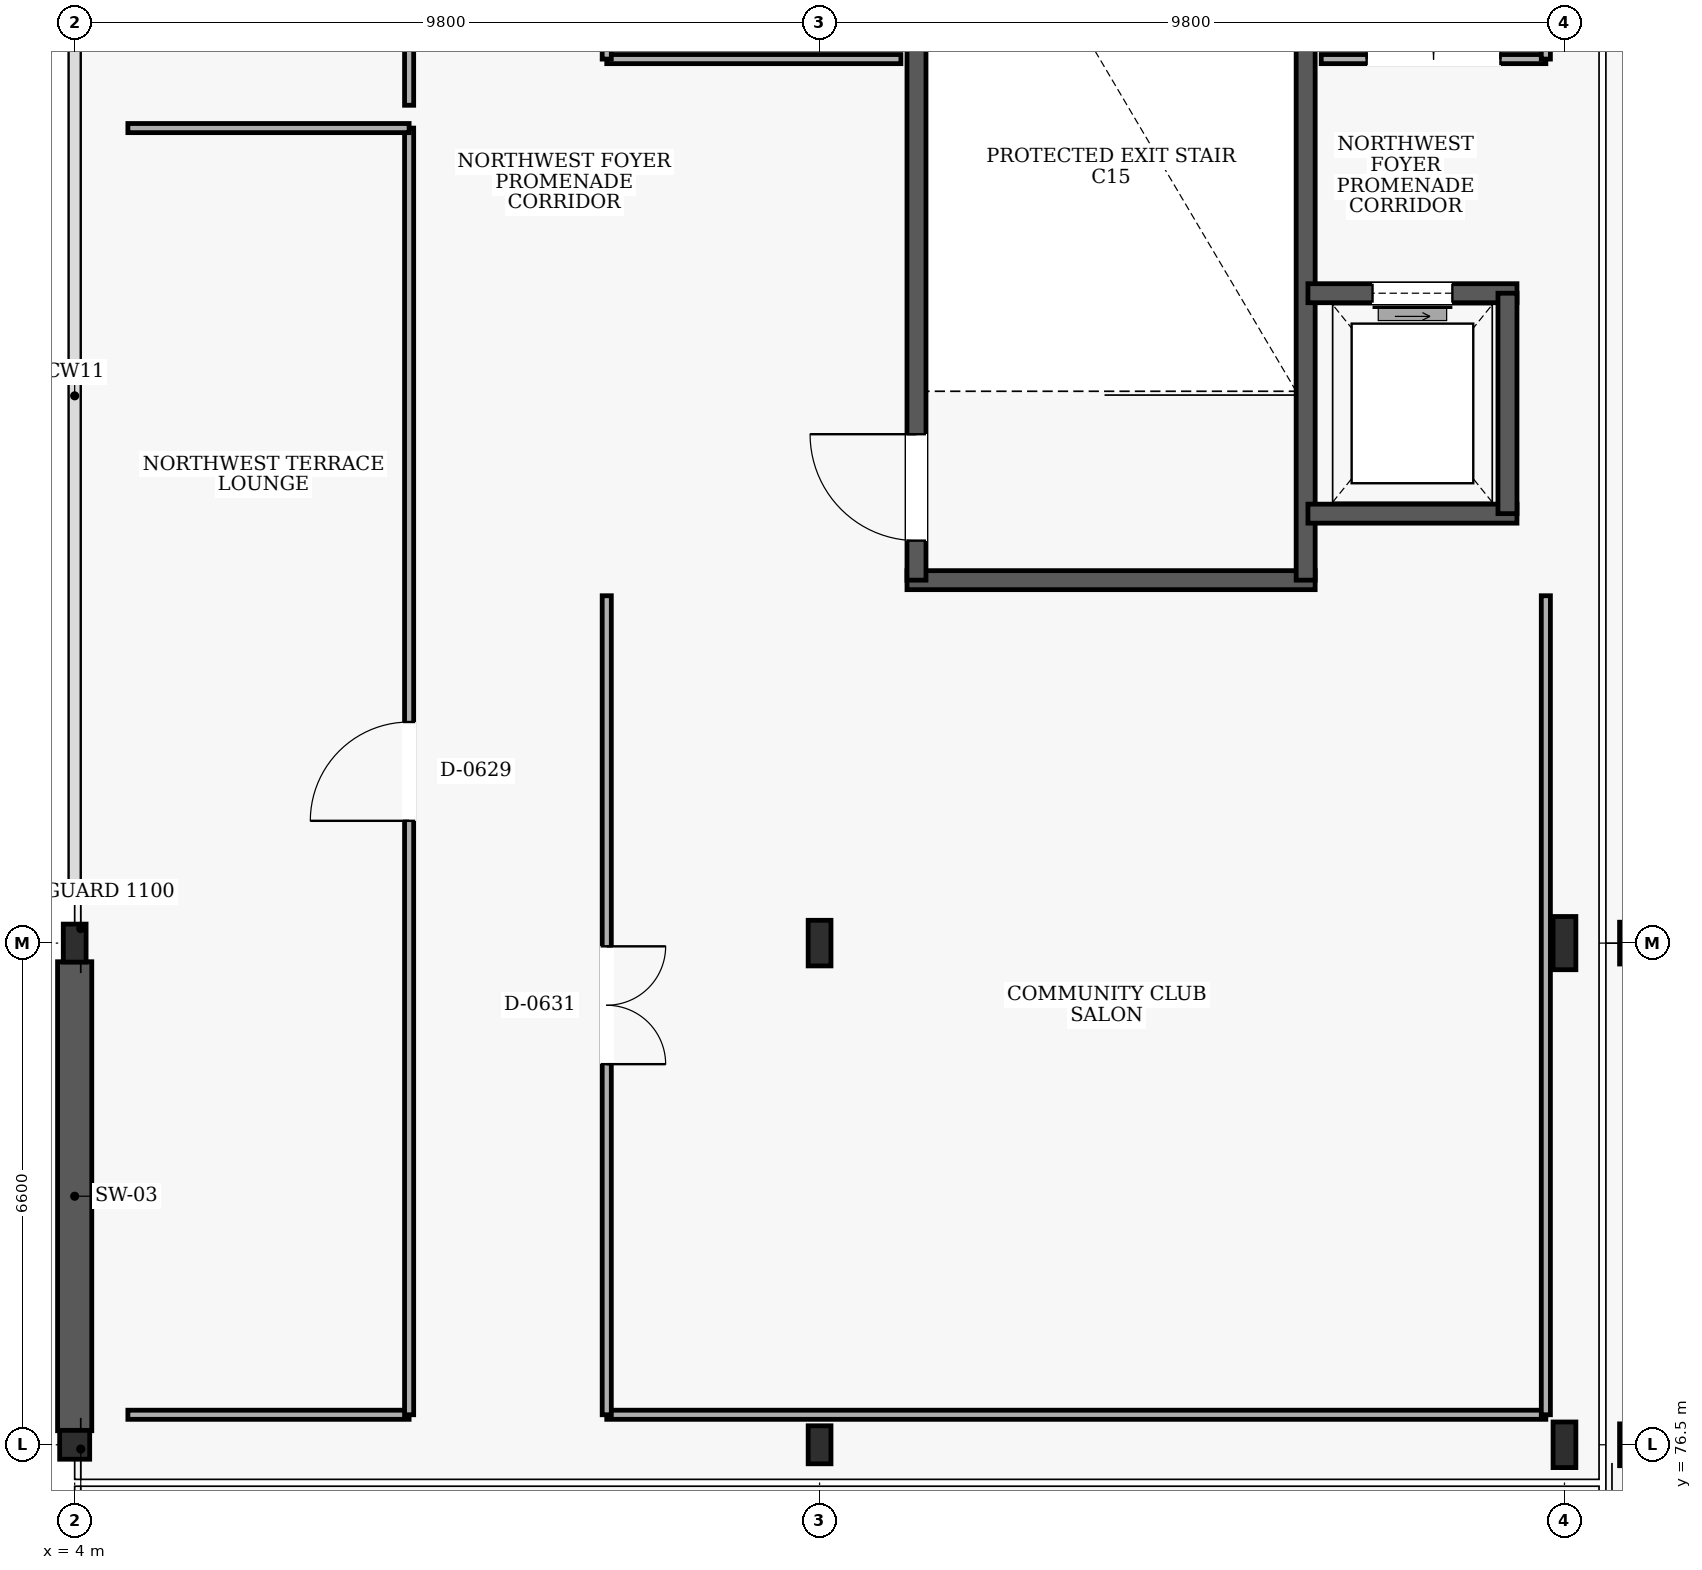
"""IFC4 building model, lengths in metres.
Left out: names, types, materials, properties, quantities, classifications, styles, units other than length and angle.
Written with IfcOpenShell. Run it as: python <this file> out.ifc"""

import sys

from ifc_helpers import new_model, si_unit, direction, frame, frame_2d, origin, origin_2d, place, context, subcontext, project, spatial, rectangle, i_section, extrude, element, fill, save


model = new_model("IFC4")
c1 = context("Model", 3, precision=1e-05, world=origin(), true_north=direction((0.0, 1.0)))
c2 = subcontext(c1, "Body", "Model", "MODEL_VIEW")
j1 = project(units=[si_unit("LENGTHUNIT", "METRE"), si_unit("PLANEANGLEUNIT", "RADIAN")], contexts=[c1])
p1 = place(None, origin())
s1 = spatial("IfcSite", under=j1, at=p1, CompositionType="ELEMENT")
p2 = place(p1, origin())
s2 = spatial("IfcBuilding", under=s1, at=p2, CompositionType="ELEMENT")
p3 = place(p2, frame((0.0, 0.0, 10.2)))
s3 = spatial("IfcBuildingStorey", under=s2, at=p3, CompositionType="ELEMENT", Elevation=10.2)
p4 = place(p3, frame((4.0, 76.5, 0.0), z_axis=(0.0, 0.0, 1.0), x_axis=(1.0, 0.0, 0.0)))
e1 = element("IfcColumn", 1, at=p4, inside=s3, PredefinedType="COLUMN", context=c2, shape_type="SweptSolid", body=[
    extrude(i_section(OverallWidth=0.395, OverallDepth=0.38, WebThickness=0.019, FlangeThickness=0.03, at=origin_2d()), origin(), (0.0, 0.0, 1.0), 4.8),
])
for number, where, z_axis, x_axis in (
    (2, (4.0, 83.1, 0.0), (0.0, 0.0, 1.0), (1.0, 0.0, 0.0)),
    (3, (13.8, 76.5, 0.0), (0.0, 0.0, 1.0), (1.0, 0.0, 0.0)),
):
    element("IfcColumn", number, at=place(p3, frame(where, z_axis=z_axis, x_axis=x_axis)), inside=s3, PredefinedType="COLUMN", context=c2, shape_type="SweptSolid", body=[
        extrude(i_section(OverallWidth=0.3, OverallDepth=0.5, WebThickness=0.014, FlangeThickness=0.028, at=origin_2d()), origin(), (0.0, 0.0, 1.0), 4.8),
    ])
for number, where, z_axis, x_axis in (
    (4, (13.8, 83.1, 0.0), (0.0, 0.0, 1.0), (1.0, 0.0, 0.0)),
    (5, (23.6, 76.5, 0.0), (0.0, 0.0, 1.0), (1.0, 0.0, 0.0)),
):
    element("IfcColumn", number, at=place(p3, frame(where, z_axis=z_axis, x_axis=x_axis)), inside=s3, PredefinedType="COLUMN", context=c2, shape_type="SweptSolid", body=[
        extrude(i_section(OverallWidth=0.3, OverallDepth=0.6, WebThickness=0.015, FlangeThickness=0.03, at=origin_2d()), origin(), (0.0, 0.0, 1.0), 4.8),
    ])
p5 = place(p3, frame((23.6, 83.1, 0.0), z_axis=(0.0, 0.0, 1.0), x_axis=(1.0, 0.0, 0.0)))
e6 = element("IfcColumn", 6, at=p5, inside=s3, PredefinedType="COLUMN", context=c2, shape_type="SweptSolid", body=[
    extrude(i_section(OverallWidth=0.3, OverallDepth=0.7, WebThickness=0.017, FlangeThickness=0.032, at=origin_2d()), origin(), (0.0, 0.0, 1.0), 4.8),
])
for number, where, z_axis, x_axis in (
    (7, (24.6, 76.5, 0.0), (0.0, 0.0, 1.0), (1.0, 0.0, 0.0)),
    (8, (24.6, 83.1, 0.0), (0.0, 0.0, 1.0), (1.0, 0.0, 0.0)),
):
    element("IfcColumn", number, at=place(p3, frame(where, z_axis=z_axis, x_axis=x_axis)), inside=s3, PredefinedType="COLUMN", context=c2, shape_type="SweptSolid", body=[
        extrude(rectangle(XDim=0.55, YDim=0.55, at=origin_2d()), origin(), (0.0, 0.0, 1.0), 4.8),
    ])
p6 = place(p3, frame((4.0, 76.685, 0.0), z_axis=(0.0, 0.0, 1.0), x_axis=(0.0, 1.0, 0.0)))
e9 = element("IfcWall", 9, at=p6, inside=s3, PredefinedType="SHEAR", context=c2, shape_type="SweptSolid", body=[
    extrude(rectangle(XDim=6.17, YDim=0.45, at=frame_2d((3.085, 0.0))), origin(), (0.0, 0.0, 1.0), 3.82),
])
p7 = place(p3, frame((14.95, 87.875, 0.0), z_axis=(0.0, 0.0, 1.0), x_axis=(1.0, 0.0, 0.0)))
e10 = element("IfcWall", 10, at=p7, inside=s3, PredefinedType="SHEAR", context=c2, shape_type="SweptSolid", body=[
    extrude(rectangle(XDim=5.37, YDim=0.25, at=frame_2d((2.685, 0.0))), origin(), (0.0, 0.0, 1.0), 4.48),
])
p8 = place(p3, frame((15.075, 87.875, 0.0), z_axis=(0.0, 0.0, 1.0), x_axis=(0.0, 1.0, 0.0)))
e11 = element("IfcWall", 11, at=p8, inside=s3, PredefinedType="SHEAR", context=c2, shape_type="SweptSolid", body=[
    extrude(rectangle(XDim=10.85, YDim=0.25, at=frame_2d((5.425, 0.0))), origin(), (0.0, 0.0, 1.0), 4.48),
])
p9 = place(p8, frame((0.52, 0.0, 0.0)))
e12 = element("IfcOpeningElement", 12, at=p9, cuts=e11, PredefinedType="OPENING", context=c2, shape_type="SweptSolid", body=[
    extrude(rectangle(XDim=1.4, YDim=2.15, at=frame_2d((0.7, 1.075))), frame((0.0, 0.135, 0.0), z_axis=(0.0, -1.0, 0.0), x_axis=(1.0, 0.0, 0.0)), (0.0, 0.0, 1.0), 0.27),
])
p10 = place(p3, frame((20.195, 87.875, 0.0), z_axis=(0.0, 0.0, 1.0), x_axis=(0.0, 1.0, 0.0)))
e13 = element("IfcWall", 13, at=p10, inside=s3, PredefinedType="SHEAR", context=c2, shape_type="SweptSolid", body=[
    extrude(rectangle(XDim=10.85, YDim=0.25, at=frame_2d((5.425, 0.0))), origin(), (0.0, 0.0, 1.0), 4.48),
])
p11 = place(p3, frame((20.225, 88.75, 0.0), z_axis=(0.0, 0.0, 1.0), x_axis=(1.0, 0.0, 0.0)))
e14 = element("IfcWall", 14, at=p11, inside=s3, PredefinedType="SHEAR", context=c2, shape_type="SweptSolid", body=[
    extrude(rectangle(XDim=2.75, YDim=0.25, at=frame_2d((1.375, 0.0))), origin(), (0.0, 0.0, 1.0), 4.48),
])
p12 = place(p3, frame((22.975, 91.65, 0.0), z_axis=(0.0, 0.0, 1.0), x_axis=(-1.0, 0.0, 0.0)))
e15 = element("IfcWall", 15, at=p12, inside=s3, PredefinedType="SHEAR", context=c2, shape_type="SweptSolid", body=[
    extrude(rectangle(XDim=2.75, YDim=0.25, at=frame_2d((1.375, 0.0))), origin(), (0.0, 0.0, 1.0), 4.48),
])
p13 = place(p12, frame((0.85, 0.0, 0.0)))
e16 = element("IfcOpeningElement", 16, at=p13, cuts=e15, PredefinedType="OPENING", context=c2, shape_type="SweptSolid", body=[
    extrude(rectangle(XDim=1.05, YDim=2.15, at=frame_2d((0.525, 1.075))), frame((0.0, 0.135, 0.0), z_axis=(0.0, -1.0, 0.0), x_axis=(1.0, 0.0, 0.0)), (0.0, 0.0, 1.0), 0.27),
])
p14 = place(p3, frame((22.85, 88.75, 0.0), z_axis=(0.0, 0.0, 1.0), x_axis=(0.0, 1.0, 0.0)))
e17 = element("IfcWall", 17, at=p14, inside=s3, PredefinedType="SHEAR", context=c2, shape_type="SweptSolid", body=[
    extrude(rectangle(XDim=2.9, YDim=0.25, at=frame_2d((1.45, 0.0))), origin(), (0.0, 0.0, 1.0), 4.48),
])
p15 = place(p3, frame((4.7, 76.895, 0.0), z_axis=(0.0, 0.0, 1.0), x_axis=(1.0, 0.0, 0.0)))
e18 = element("IfcWall", 18, at=p15, inside=s3, PredefinedType="PARTITIONING", context=c2, shape_type="SweptSolid", body=[
    extrude(rectangle(XDim=3.7, YDim=0.12, at=frame_2d((1.85, 0.0))), origin(), (0.0, 0.0, 1.0), 3.82),
])
p16 = place(p3, frame((8.4, 76.895, 0.0), z_axis=(0.0, 0.0, 1.0), x_axis=(0.0, 1.0, 0.0)))
e19 = element("IfcWall", 19, at=p16, inside=s3, PredefinedType="PARTITIONING", context=c2, shape_type="SweptSolid", body=[
    extrude(rectangle(XDim=16.927, YDim=0.12, at=frame_2d((8.464, 0.0))), origin(), (0.0, 0.0, 1.0), 4.48),
])
p17 = place(p16, frame((7.814, 0.0, 0.0)))
e20 = element("IfcOpeningElement", 20, at=p17, cuts=e19, PredefinedType="OPENING", context=c2, shape_type="SweptSolid", body=[
    extrude(rectangle(XDim=1.3, YDim=2.2, at=frame_2d((0.65, 1.1))), frame((0.0, 0.07, 0.0), z_axis=(0.0, -1.0, 0.0), x_axis=(1.0, 0.0, 0.0)), (0.0, 0.0, 1.0), 0.14),
])
p18 = place(p3, frame((8.4, 93.823, 0.0), z_axis=(0.0, 0.0, 1.0), x_axis=(-1.0, 0.0, 0.0)))
e21 = element("IfcWall", 21, at=p18, inside=s3, PredefinedType="PARTITIONING", context=c2, shape_type="SweptSolid", body=[
    extrude(rectangle(XDim=3.7, YDim=0.12, at=frame_2d((1.85, 0.0))), origin(), (0.0, 0.0, 1.0), 4.48),
])
p19 = place(p3, frame((8.4, 94.123, 0.0), z_axis=(0.0, 0.0, 1.0), x_axis=(0.0, 1.0, 0.0)))
e22 = element("IfcWall", 22, at=p19, inside=s3, PredefinedType="PARTITIONING", context=c2, shape_type="SweptSolid", body=[
    extrude(rectangle(XDim=16.927, YDim=0.12, at=frame_2d((8.464, 0.0))), origin(), (0.0, 0.0, 1.0), 4.48),
])
p20 = place(p19, frame((7.764, 0.0, 0.0)))
e23 = element("IfcOpeningElement", 23, at=p20, cuts=e22, PredefinedType="OPENING", context=c2, shape_type="SweptSolid", body=[
    extrude(rectangle(XDim=1.4, YDim=2.2, at=frame_2d((0.7, 1.1))), frame((0.0, 0.07, 0.0), z_axis=(0.0, -1.0, 0.0), x_axis=(1.0, 0.0, 0.0)), (0.0, 0.0, 1.0), 0.14),
])
p21 = place(p3, frame((11.0, 76.895, 0.0), z_axis=(0.0, 0.0, 1.0), x_axis=(1.0, 0.0, 0.0)))
e24 = element("IfcWall", 24, at=p21, inside=s3, PredefinedType="PARTITIONING", context=c2, shape_type="SweptSolid", body=[
    extrude(rectangle(XDim=12.355, YDim=0.12, at=frame_2d((6.177, 0.0))), origin(), (0.0, 0.0, 1.0), 3.82),
])
p22 = place(p3, frame((23.355, 76.895, 0.0), z_axis=(0.0, 0.0, 1.0), x_axis=(0.0, 1.0, 0.0)))
e25 = element("IfcWall", 25, at=p22, inside=s3, PredefinedType="PARTITIONING", context=c2, shape_type="SweptSolid", body=[
    extrude(rectangle(XDim=10.775, YDim=0.12, at=frame_2d((5.387, 0.0))), origin(), (0.0, 0.0, 1.0), 3.82),
])
p23 = place(p3, frame((11.0, 87.67, 0.0), z_axis=(0.0, 0.0, 1.0), x_axis=(0.0, -1.0, 0.0)))
e26 = element("IfcWall", 26, at=p23, inside=s3, PredefinedType="PARTITIONING", context=c2, shape_type="SweptSolid", body=[
    extrude(rectangle(XDim=10.775, YDim=0.12, at=frame_2d((5.387, 0.0))), origin(), (0.0, 0.0, 1.0), 4.48),
])
p24 = place(p23, frame((4.613, 0.0, 0.0)))
e27 = element("IfcOpeningElement", 27, at=p24, cuts=e26, PredefinedType="OPENING", context=c2, shape_type="SweptSolid", body=[
    extrude(rectangle(XDim=1.55, YDim=2.2, at=frame_2d((0.775, 1.1))), frame((0.0, 0.07, 0.0), z_axis=(0.0, -1.0, 0.0), x_axis=(1.0, 0.0, 0.0)), (0.0, 0.0, 1.0), 0.14),
])
p25 = place(p3, frame((11.0, 94.73, 0.0), z_axis=(0.0, 0.0, 1.0), x_axis=(1.0, 0.0, 0.0)))
e28 = element("IfcWall", 28, at=p25, inside=s3, PredefinedType="PARTITIONING", context=c2, shape_type="SweptSolid", body=[
    extrude(rectangle(XDim=3.87, YDim=0.12, at=frame_2d((1.935, 0.0))), origin(), (0.0, 0.0, 1.0), 4.48),
])
p26 = place(p3, frame((11.0, 98.93, 0.0), z_axis=(0.0, 0.0, 1.0), x_axis=(0.0, -1.0, 0.0)))
e29 = element("IfcWall", 29, at=p26, inside=s3, PredefinedType="PARTITIONING", context=c2, shape_type="SweptSolid", body=[
    extrude(rectangle(XDim=4.2, YDim=0.12, at=frame_2d((2.1, 0.0))), origin(), (0.0, 0.0, 1.0), 4.48),
])
p27 = place(p26, frame((1.26, 0.0, 0.0)))
e30 = element("IfcOpeningElement", 30, at=p27, cuts=e29, PredefinedType="OPENING", context=c2, shape_type="SweptSolid", body=[
    extrude(rectangle(XDim=1.68, YDim=2.25, at=frame_2d((0.84, 1.125))), frame((0.0, 0.07, 0.0), z_axis=(0.0, -1.0, 0.0), x_axis=(1.0, 0.0, 0.0)), (0.0, 0.0, 1.0), 0.14),
])
p28 = place(p3, frame((20.4, 94.73, 0.0), z_axis=(0.0, 0.0, 1.0), x_axis=(1.0, 0.0, 0.0)))
e31 = element("IfcWall", 31, at=p28, inside=s3, PredefinedType="PARTITIONING", context=c2, shape_type="SweptSolid", body=[
    extrude(rectangle(XDim=2.955, YDim=0.12, at=frame_2d((1.478, 0.0))), origin(), (0.0, 0.0, 1.0), 4.48),
])
p29 = place(p28, frame((0.597, 0.0, 0.0)))
e32 = element("IfcOpeningElement", 32, at=p29, cuts=e31, PredefinedType="OPENING", context=c2, shape_type="SweptSolid", body=[
    extrude(rectangle(XDim=1.76, YDim=2.25, at=frame_2d((0.88, 1.125))), frame((0.0, 0.07, 0.0), z_axis=(0.0, -1.0, 0.0), x_axis=(1.0, 0.0, 0.0)), (0.0, 0.0, 1.0), 0.14),
])
p30 = place(p3, frame((23.355, 94.73, 0.0), z_axis=(0.0, 0.0, 1.0), x_axis=(0.0, 1.0, 0.0)))
e33 = element("IfcWall", 33, at=p30, inside=s3, PredefinedType="PARTITIONING", context=c2, shape_type="SweptSolid", body=[
    extrude(rectangle(XDim=4.2, YDim=0.12, at=frame_2d((2.1, 0.0))), origin(), (0.0, 0.0, 1.0), 3.72),
])
p31 = place(p9, frame((1.4, 0.0, 0.0), z_axis=(0.0, 0.0, 1.0), x_axis=(-1.0, 0.0, 0.0)))
e34 = element("IfcDoor", 34, at=p31, inside=s3, OperationType="SINGLE_SWING_LEFT", PredefinedType="DOOR", context=c2, shape_type="SweptSolid", body=[
    extrude(rectangle(XDim=1.4, YDim=2.15, at=frame_2d((0.7, 1.075))), frame((0.0, 0.025, 0.0), z_axis=(0.0, -1.0, 0.0), x_axis=(1.0, 0.0, 0.0)), (0.0, 0.0, 1.0), 0.05),
])
fill(e12, e34)
p32 = place(p13, origin())
e35 = element("IfcDoor", 35, at=p32, inside=s3, OperationType="SLIDING_TO_RIGHT", PredefinedType="DOOR", context=c2, shape_type="SweptSolid", body=[
    extrude(rectangle(XDim=1.05, YDim=2.15, at=frame_2d((0.525, 1.075))), frame((0.0, 0.025, 0.0), z_axis=(0.0, -1.0, 0.0), x_axis=(1.0, 0.0, 0.0)), (0.0, 0.0, 1.0), 0.05),
])
fill(e16, e35)
p33 = place(p17, origin())
e36 = element("IfcDoor", 36, at=p33, inside=s3, OperationType="SINGLE_SWING_LEFT", PredefinedType="DOOR", context=c2, shape_type="SweptSolid", body=[
    extrude(rectangle(XDim=1.3, YDim=2.2, at=frame_2d((0.65, 1.1))), frame((0.0, 0.025, 0.0), z_axis=(0.0, -1.0, 0.0), x_axis=(1.0, 0.0, 0.0)), (0.0, 0.0, 1.0), 0.05),
])
fill(e20, e36)
p34 = place(p24, origin())
e37 = element("IfcDoor", 37, at=p34, inside=s3, OperationType="DOUBLE_DOOR_SINGLE_SWING", PredefinedType="DOOR", context=c2, shape_type="SweptSolid", body=[
    extrude(rectangle(XDim=1.55, YDim=2.2, at=frame_2d((0.775, 1.1))), frame((0.0, 0.025, 0.0), z_axis=(0.0, -1.0, 0.0), x_axis=(1.0, 0.0, 0.0)), (0.0, 0.0, 1.0), 0.05),
])
fill(e27, e37)
p35 = place(p29, origin())
e38 = element("IfcDoor", 38, at=p35, inside=s3, OperationType="DOUBLE_DOOR_SINGLE_SWING", PredefinedType="DOOR", context=c2, shape_type="SweptSolid", body=[
    extrude(rectangle(XDim=1.76, YDim=2.25, at=frame_2d((0.88, 1.125))), frame((0.0, 0.025, 0.0), z_axis=(0.0, -1.0, 0.0), x_axis=(1.0, 0.0, 0.0)), (0.0, 0.0, 1.0), 0.05),
])
fill(e32, e38)
save(model, sys.argv[1])
